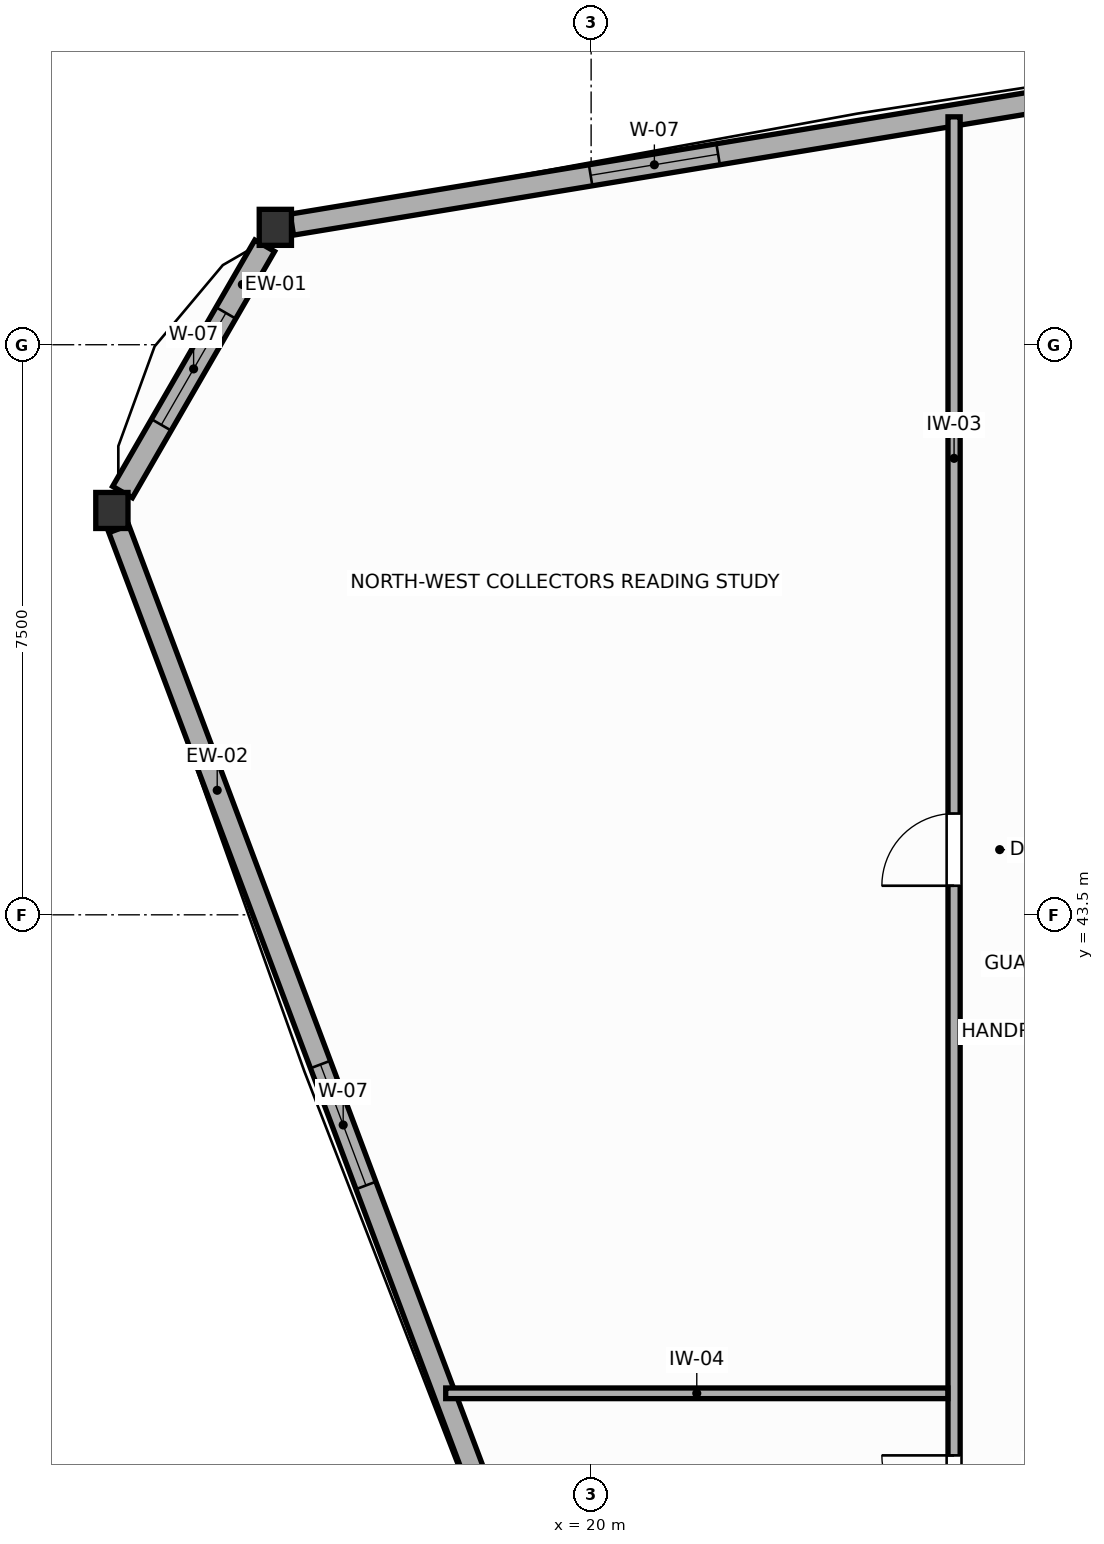
"""IFC4 building model, lengths in metres.
Left out: names, types, materials, properties, quantities, classifications, styles, units other than length and angle.
Written with IfcOpenShell. Run it as: python <this file> out.ifc"""

import sys

from ifc_helpers import new_model, si_unit, direction, frame, frame_2d, origin, origin_2d, place, context, subcontext, project, spatial, rectangle, i_section, extrude, source, transform, mapped, element, fill, save


model = new_model("IFC4")
c1 = context("Model", 3, precision=1e-05, world=origin(), true_north=direction((0.0, 1.0)))
c2 = subcontext(c1, "Body", "Model", "MODEL_VIEW")
j1 = project(units=[si_unit("LENGTHUNIT", "METRE"), si_unit("PLANEANGLEUNIT", "RADIAN")], contexts=[c1])
p1 = place(None, origin())
s1 = spatial("IfcSite", under=j1, at=p1, CompositionType="ELEMENT")
p2 = place(p1, origin())
s2 = spatial("IfcBuilding", under=s1, at=p2, CompositionType="ELEMENT")
p3 = place(p2, frame((0.0, 0.0, 95.1)))
s3 = spatial("IfcBuildingStorey", under=s2, at=p3, CompositionType="ELEMENT", Elevation=95.1)
m1 = source(origin(), c2, "Body", "SweptSolid", [
    extrude(i_section(OverallWidth=0.424, OverallDepth=0.474, WebThickness=0.045, FlangeThickness=0.072, FilletRadius=0.015, at=origin_2d()), origin(), (0.0, 0.0, 1.0), 3.9),
])
for number, where, z_axis, x_axis in (
    (1, (15.845, 52.544, 0.0), (0.0, 0.0, 1.0), (1.0, 0.0, 0.0)),
    (2, (13.695, 48.82, 0.0), (0.0, 0.0, 1.0), (1.0, 0.0, 0.0)),
):
    element("IfcColumn", number, at=place(p3, frame(where, z_axis=z_axis, x_axis=x_axis)), inside=s3, PredefinedType="COLUMN", context=c2, shape_type="MappedRepresentation", body=[
        mapped(m1, transform((0.0, 0.0, 0.0), scale=1.0)),
    ])
p4 = place(p3, frame((32.674, 55.322, 0.0), z_axis=(0.0, 0.0, 1.0), x_axis=(-0.986649424809, -0.162858566012, 0.0)))
e3 = element("IfcWall", 3, at=p4, inside=s3, PredefinedType="SOLIDWALL", context=c2, shape_type="SweptSolid", body=[
    extrude(rectangle(XDim=16.836, YDim=0.28, at=frame_2d((8.418, 0.0))), origin(), (0.0, 0.0, 1.0), 2.07),
])
p5 = place(p4, frame((11.152, 0.0, 0.75)))
e4 = element("IfcOpeningElement", 4, at=p5, cuts=e3, PredefinedType="OPENING", context=c2, shape_type="SweptSolid", body=[
    extrude(rectangle(XDim=1.7, YDim=1.1, at=frame_2d((0.85, 0.55))), frame((0.0, 0.15, 0.0), z_axis=(0.0, -1.0, 0.0), x_axis=(1.0, 0.0, 0.0)), (0.0, 0.0, 1.0), 0.3),
])
p6 = place(p3, frame((15.706, 52.302, 0.0), z_axis=(0.0, 0.0, 1.0), x_axis=(-0.500012356405, -0.866018269693, 0.0)))
e5 = element("IfcWall", 5, at=p6, inside=s3, PredefinedType="SOLIDWALL", context=c2, shape_type="SweptSolid", body=[
    extrude(rectangle(XDim=3.742, YDim=0.3, at=frame_2d((1.871, 0.0))), origin(), (0.0, 0.0, 1.0), 2.07),
])
p7 = place(p6, frame((1.021, 0.0, 0.75)))
e6 = element("IfcOpeningElement", 6, at=p7, cuts=e5, PredefinedType="OPENING", context=c2, shape_type="SweptSolid", body=[
    extrude(rectangle(XDim=1.7, YDim=1.1, at=frame_2d((0.85, 0.55))), frame((0.0, 0.16, 0.0), z_axis=(0.0, -1.0, 0.0), x_axis=(1.0, 0.0, 0.0)), (0.0, 0.0, 1.0), 0.32),
])
p8 = place(p3, frame((13.786, 48.577, 0.0), z_axis=(0.0, 0.0, 1.0), x_axis=(0.352279020809, -0.935895021622, 0.0)))
e7 = element("IfcWall", 7, at=p8, inside=s3, PredefinedType="SOLIDWALL", context=c2, shape_type="SweptSolid", body=[
    extrude(rectangle(XDim=16.759, YDim=0.28, at=frame_2d((8.379, 0.0))), origin(), (0.0, 0.0, 1.0), 2.07),
])
p9 = place(p8, frame((7.53, 0.0, 0.75)))
e8 = element("IfcOpeningElement", 8, at=p9, cuts=e7, PredefinedType="OPENING", context=c2, shape_type="SweptSolid", body=[
    extrude(rectangle(XDim=1.7, YDim=1.1, at=frame_2d((0.85, 0.55))), frame((0.0, 0.15, 0.0), z_axis=(0.0, -1.0, 0.0), x_axis=(1.0, 0.0, 0.0)), (0.0, 0.0, 1.0), 0.3),
])
p10 = place(p3, frame((24.775, 32.31, 0.0), z_axis=(0.0, 0.0, 1.0), x_axis=(0.0, 1.0, 0.0)))
e9 = element("IfcWall", 9, at=p10, inside=s3, PredefinedType="PARTITIONING", context=c2, shape_type="SweptSolid", body=[
    extrude(rectangle(XDim=21.688, YDim=0.16, at=frame_2d((10.844, 0.0))), origin(), (0.0, 0.0, 1.0), 3.7),
])
p11 = place(p10, frame((3.128, 0.0, 0.0)))
e10 = element("IfcOpeningElement", 10, at=p11, cuts=e9, PredefinedType="OPENING", context=c2, shape_type="SweptSolid", body=[
    extrude(rectangle(XDim=0.95, YDim=2.05, at=frame_2d((0.475, 1.025))), frame((0.0, 0.09, 0.0), z_axis=(0.0, -1.0, 0.0), x_axis=(1.0, 0.0, 0.0)), (0.0, 0.0, 1.0), 0.18),
])
p12 = place(p10, frame((11.573, 0.0, 0.0)))
e11 = element("IfcOpeningElement", 11, at=p12, cuts=e9, PredefinedType="OPENING", context=c2, shape_type="SweptSolid", body=[
    extrude(rectangle(XDim=0.95, YDim=2.05, at=frame_2d((0.475, 1.025))), frame((0.0, 0.09, 0.0), z_axis=(0.0, -1.0, 0.0), x_axis=(1.0, 0.0, 0.0)), (0.0, 0.0, 1.0), 0.18),
])
p13 = place(p3, frame((18.087, 37.205, 0.0), z_axis=(0.0, 0.0, 1.0), x_axis=(1.0, 0.0, 0.0)))
e12 = element("IfcWall", 12, at=p13, inside=s3, PredefinedType="PARTITIONING", context=c2, shape_type="SweptSolid", body=[
    extrude(rectangle(XDim=6.606, YDim=0.14, at=frame_2d((3.303, 0.0))), origin(), (0.0, 0.0, 1.0), 3.7),
])
p14 = place(p5, origin())
e13 = element("IfcWindow", 13, at=p14, inside=s3, PartitioningType="SINGLE_PANEL", PredefinedType="WINDOW", context=c2, shape_type="SweptSolid", body=[
    extrude(rectangle(XDim=1.7, YDim=1.1, at=frame_2d((0.85, 0.55))), frame((0.0, 0.03, 0.0), z_axis=(0.0, -1.0, 0.0), x_axis=(1.0, 0.0, 0.0)), (0.0, 0.0, 1.0), 0.06),
])
fill(e4, e13)
p15 = place(p7, origin())
e14 = element("IfcWindow", 14, at=p15, inside=s3, PartitioningType="SINGLE_PANEL", PredefinedType="WINDOW", context=c2, shape_type="SweptSolid", body=[
    extrude(rectangle(XDim=1.7, YDim=1.1, at=frame_2d((0.85, 0.55))), frame((0.0, 0.03, 0.0), z_axis=(0.0, -1.0, 0.0), x_axis=(1.0, 0.0, 0.0)), (0.0, 0.0, 1.0), 0.06),
])
fill(e6, e14)
p16 = place(p9, origin())
e15 = element("IfcWindow", 15, at=p16, inside=s3, PartitioningType="SINGLE_PANEL", PredefinedType="WINDOW", context=c2, shape_type="SweptSolid", body=[
    extrude(rectangle(XDim=1.7, YDim=1.1, at=frame_2d((0.85, 0.55))), frame((0.0, 0.03, 0.0), z_axis=(0.0, -1.0, 0.0), x_axis=(1.0, 0.0, 0.0)), (0.0, 0.0, 1.0), 0.06),
])
fill(e8, e15)
p17 = place(p11, origin())
e16 = element("IfcDoor", 16, at=p17, inside=s3, OperationType="SINGLE_SWING_RIGHT", PredefinedType="DOOR", context=c2, shape_type="SweptSolid", body=[
    extrude(rectangle(XDim=0.95, YDim=2.05, at=frame_2d((0.475, 1.025))), frame((0.0, 0.025, 0.0), z_axis=(0.0, -1.0, 0.0), x_axis=(1.0, 0.0, 0.0)), (0.0, 0.0, 1.0), 0.05),
])
fill(e10, e16)
p18 = place(p12, origin())
e17 = element("IfcDoor", 17, at=p18, inside=s3, OperationType="SINGLE_SWING_LEFT", PredefinedType="DOOR", context=c2, shape_type="SweptSolid", body=[
    extrude(rectangle(XDim=0.95, YDim=2.05, at=frame_2d((0.475, 1.025))), frame((0.0, 0.025, 0.0), z_axis=(0.0, -1.0, 0.0), x_axis=(1.0, 0.0, 0.0)), (0.0, 0.0, 1.0), 0.05),
])
fill(e11, e17)
save(model, sys.argv[1])
